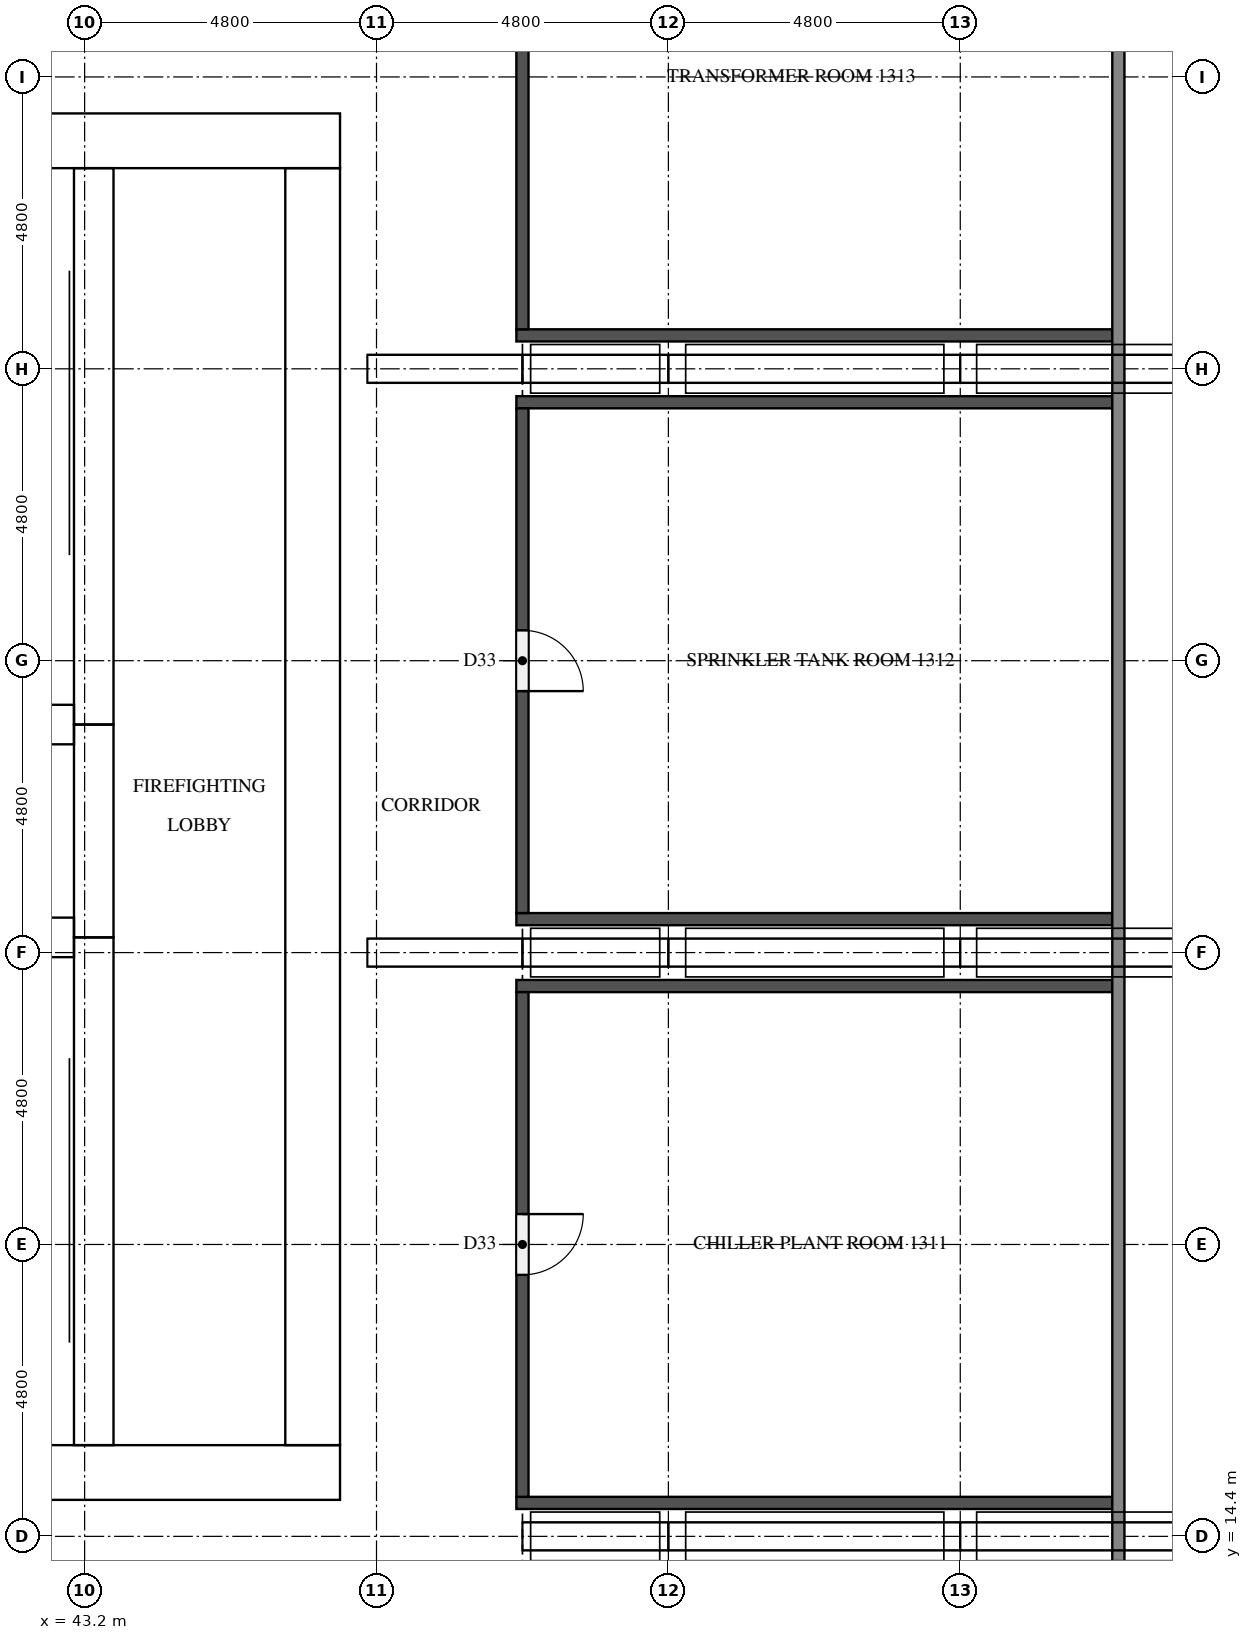
"""IFC4 building model, lengths in metres.
Left out: names, types, materials, properties, quantities, classifications, styles, units other than length and angle.
Written with IfcOpenShell. Run it as: python <this file> out.ifc"""

import sys

from ifc_helpers import new_model, si_unit, direction, frame, frame_2d, origin, place, context, subcontext, project, spatial, rectangle, extrude, element, fill, save


model = new_model("IFC4")
c1 = context("Model", 3, precision=1e-05, world=origin(), true_north=direction((0.0, 1.0)))
c2 = subcontext(c1, "Body", "Model", "MODEL_VIEW")
j1 = project(units=[si_unit("LENGTHUNIT", "METRE"), si_unit("PLANEANGLEUNIT", "RADIAN")], contexts=[c1])
p1 = place(None, origin())
s1 = spatial("IfcSite", under=j1, at=p1, CompositionType="ELEMENT")
p2 = place(p1, origin())
s2 = spatial("IfcBuilding", under=s1, at=p2, CompositionType="ELEMENT")
p3 = place(p2, frame((0.0, 0.0, 53.9)))
s3 = spatial("IfcBuildingStorey", under=s2, at=p3, CompositionType="ELEMENT", Elevation=53.9)
p4 = place(p3, frame((15.0, 15.45, 0.0), z_axis=(0.0, 0.0, 1.0), x_axis=(1.0, 0.0, 0.0)))
e1 = element("IfcWall", 1, at=p4, inside=s3, PredefinedType="SHEAR", context=c2, shape_type="SweptSolid", body=[
    extrude(rectangle(XDim=32.4, YDim=0.9, at=frame_2d((16.2, 0.0))), origin(), (0.0, 0.0, 1.0), 5.1),
])
p5 = place(p4, frame((15.3, 0.0, 0.0)))
e2 = element("IfcOpeningElement", 2, at=p5, cuts=e1, PredefinedType="OPENING", context=c2, shape_type="SweptSolid", body=[
    extrude(rectangle(XDim=1.8, YDim=2.1, at=frame_2d((0.9, 1.05))), frame((0.0, 0.46, 0.0), z_axis=(0.0, -1.0, 0.0), x_axis=(1.0, 0.0, 0.0)), (0.0, 0.0, 1.0), 0.92),
])
p6 = place(p3, frame((15.0, 37.35, 0.0), z_axis=(0.0, 0.0, 1.0), x_axis=(1.0, 0.0, 0.0)))
e3 = element("IfcWall", 3, at=p6, inside=s3, PredefinedType="SHEAR", context=c2, shape_type="SweptSolid", body=[
    extrude(rectangle(XDim=32.4, YDim=0.9, at=frame_2d((16.2, 0.0))), origin(), (0.0, 0.0, 1.0), 5.1),
])
p7 = place(p6, frame((15.3, 0.0, 0.0)))
e4 = element("IfcOpeningElement", 4, at=p7, cuts=e3, PredefinedType="OPENING", context=c2, shape_type="SweptSolid", body=[
    extrude(rectangle(XDim=1.8, YDim=2.1, at=frame_2d((0.9, 1.05))), frame((0.0, 0.46, 0.0), z_axis=(0.0, -1.0, 0.0), x_axis=(1.0, 0.0, 0.0)), (0.0, 0.0, 1.0), 0.92),
])
p8 = place(p6, frame((1.794, 0.0, 0.0)))
e5 = element("IfcOpeningElement", 5, at=p8, cuts=e3, PredefinedType="OPENING", context=c2, shape_type="SweptSolid", body=[
    extrude(rectangle(XDim=1.0, YDim=2.1, at=frame_2d((0.5, 1.05))), frame((0.0, 0.46, 0.0), z_axis=(0.0, -1.0, 0.0), x_axis=(1.0, 0.0, 0.0)), (0.0, 0.0, 1.0), 0.92),
])
p9 = place(p6, frame((5.331, 0.0, 0.0)))
e6 = element("IfcOpeningElement", 6, at=p9, cuts=e3, PredefinedType="OPENING", context=c2, shape_type="SweptSolid", body=[
    extrude(rectangle(XDim=1.0, YDim=2.1, at=frame_2d((0.5, 1.05))), frame((0.0, 0.46, 0.0), z_axis=(0.0, -1.0, 0.0), x_axis=(1.0, 0.0, 0.0)), (0.0, 0.0, 1.0), 0.92),
])
p10 = place(p3, frame((46.95, 15.9, 0.0), z_axis=(0.0, 0.0, 1.0), x_axis=(0.0, 1.0, 0.0)))
e7 = element("IfcWall", 7, at=p10, inside=s3, PredefinedType="SHEAR", context=c2, shape_type="SweptSolid", body=[
    extrude(rectangle(XDim=21.0, YDim=0.9, at=frame_2d((10.5, 0.0))), origin(), (0.0, 0.0, 1.0), 5.1),
])
p11 = place(p10, frame((10.2, 0.0, 0.0)))
e8 = element("IfcOpeningElement", 8, at=p11, cuts=e7, PredefinedType="OPENING", context=c2, shape_type="SweptSolid", body=[
    extrude(rectangle(XDim=1.2, YDim=2.1, at=frame_2d((0.6, 1.05))), frame((0.0, 0.46, 0.0), z_axis=(0.0, -1.0, 0.0), x_axis=(1.0, 0.0, 0.0)), (0.0, 0.0, 1.0), 0.92),
])
p12 = place(p3, frame((43.35, 15.9, 0.0), z_axis=(0.0, 0.0, 1.0), x_axis=(0.0, 1.0, 0.0)))
e9 = element("IfcWall", 9, at=p12, inside=s3, PredefinedType="SHEAR", context=c2, shape_type="SweptSolid", body=[
    extrude(rectangle(XDim=8.35, YDim=0.65, at=frame_2d((4.175, 0.0))), origin(), (0.0, 0.0, 1.0), 5.1),
])
p13 = place(p12, frame((0.3, 0.0, 0.0)))
e10 = element("IfcOpeningElement", 10, at=p13, cuts=e9, PredefinedType="OPENING", context=c2, shape_type="SweptSolid", body=[
    extrude(rectangle(XDim=1.2, YDim=2.1, at=frame_2d((0.6, 1.05))), frame((0.0, 0.335, 0.0), z_axis=(0.0, -1.0, 0.0), x_axis=(1.0, 0.0, 0.0)), (0.0, 0.0, 1.0), 0.67),
])
p14 = place(p3, frame((43.35, 24.25, 0.0), z_axis=(0.0, 0.0, 1.0), x_axis=(0.0, 1.0, 0.0)))
e11 = element("IfcWall", 11, at=p14, inside=s3, PredefinedType="SHEAR", context=c2, shape_type="SweptSolid", body=[
    extrude(rectangle(XDim=3.5, YDim=0.65, at=frame_2d((1.75, 0.0))), origin(), (0.0, 0.0, 1.0), 5.1),
])
p15 = place(p14, frame((1.2, 0.0, 0.0)))
e12 = element("IfcOpeningElement", 12, at=p15, cuts=e11, PredefinedType="OPENING", context=c2, shape_type="SweptSolid", body=[
    extrude(rectangle(XDim=1.1, YDim=2.1, at=frame_2d((0.55, 1.05))), frame((0.0, 0.335, 0.0), z_axis=(0.0, -1.0, 0.0), x_axis=(1.0, 0.0, 0.0)), (0.0, 0.0, 1.0), 0.67),
])
p16 = place(p3, frame((43.35, 27.75, 0.0), z_axis=(0.0, 0.0, 1.0), x_axis=(0.0, 1.0, 0.0)))
e13 = element("IfcWall", 13, at=p16, inside=s3, PredefinedType="SHEAR", context=c2, shape_type="SweptSolid", body=[
    extrude(rectangle(XDim=9.15, YDim=0.65, at=frame_2d((4.575, 0.0))), origin(), (0.0, 0.0, 1.0), 5.1),
])
p17 = place(p16, frame((7.65, 0.0, 0.0)))
e14 = element("IfcOpeningElement", 14, at=p17, cuts=e13, PredefinedType="OPENING", context=c2, shape_type="SweptSolid", body=[
    extrude(rectangle(XDim=1.2, YDim=2.1, at=frame_2d((0.6, 1.05))), frame((0.0, 0.335, 0.0), z_axis=(0.0, -1.0, 0.0), x_axis=(1.0, 0.0, 0.0)), (0.0, 0.0, 1.0), 0.67),
])
for number, where, z_axis, x_axis in (
    (15, (39.625, 24.25, 0.0), (0.0, 0.0, 1.0), (1.0, 0.0, 0.0)),
    (16, (39.625, 27.75, 0.0), (0.0, 0.0, 1.0), (1.0, 0.0, 0.0)),
):
    element("IfcWall", number, at=place(p3, frame(where, z_axis=z_axis, x_axis=x_axis)), inside=s3, PredefinedType="SHEAR", context=c2, shape_type="SweptSolid", body=[
        extrude(rectangle(XDim=3.4, YDim=0.65, at=frame_2d((1.7, 0.0))), origin(), (0.0, 0.0, 1.0), 5.1),
    ])
for number, where, z_axis, x_axis in (
    (17, (50.3, 14.95, 0.0), (0.0, 0.0, 1.0), (1.0, 0.0, 0.0)),
    (18, (50.3, 23.45, 0.0), (0.0, 0.0, 1.0), (1.0, 0.0, 0.0)),
    (19, (50.3, 24.55, 0.0), (0.0, 0.0, 1.0), (1.0, 0.0, 0.0)),
    (20, (50.3, 33.05, 0.0), (0.0, 0.0, 1.0), (1.0, 0.0, 0.0)),
    (21, (50.3, 34.15, 0.0), (0.0, 0.0, 1.0), (1.0, 0.0, 0.0)),
):
    element("IfcWall", number, at=place(p3, frame(where, z_axis=z_axis, x_axis=x_axis)), inside=s3, PredefinedType="PARTITIONING", context=c2, shape_type="SweptSolid", body=[
        extrude(rectangle(XDim=9.8, YDim=0.2, at=frame_2d((4.9, 0.0))), origin(), (0.0, 0.0, 1.0), 5.1),
    ])
p18 = place(p3, frame((50.4, 23.35, 0.0), z_axis=(0.0, 0.0, 1.0), x_axis=(0.0, -1.0, 0.0)))
e22 = element("IfcWall", 22, at=p18, inside=s3, PredefinedType="PARTITIONING", context=c2, shape_type="SweptSolid", body=[
    extrude(rectangle(XDim=8.3, YDim=0.2, at=frame_2d((4.15, 0.0))), origin(), (0.0, 0.0, 1.0), 5.1),
])
p19 = place(p18, frame((3.65, 0.0, 0.0)))
e23 = element("IfcOpeningElement", 23, at=p19, cuts=e22, PredefinedType="OPENING", context=c2, shape_type="SweptSolid", body=[
    extrude(rectangle(XDim=1.0, YDim=2.1, at=frame_2d((0.5, 1.05))), frame((0.0, 0.11, 0.0), z_axis=(0.0, -1.0, 0.0), x_axis=(1.0, 0.0, 0.0)), (0.0, 0.0, 1.0), 0.22),
])
p20 = place(p3, frame((50.4, 32.95, 0.0), z_axis=(0.0, 0.0, 1.0), x_axis=(0.0, -1.0, 0.0)))
e24 = element("IfcWall", 24, at=p20, inside=s3, PredefinedType="PARTITIONING", context=c2, shape_type="SweptSolid", body=[
    extrude(rectangle(XDim=8.3, YDim=0.2, at=frame_2d((4.15, 0.0))), origin(), (0.0, 0.0, 1.0), 5.1),
])
p21 = place(p20, frame((3.65, 0.0, 0.0)))
e25 = element("IfcOpeningElement", 25, at=p21, cuts=e24, PredefinedType="OPENING", context=c2, shape_type="SweptSolid", body=[
    extrude(rectangle(XDim=1.0, YDim=2.1, at=frame_2d((0.5, 1.05))), frame((0.0, 0.11, 0.0), z_axis=(0.0, -1.0, 0.0), x_axis=(1.0, 0.0, 0.0)), (0.0, 0.0, 1.0), 0.22),
])
p22 = place(p3, frame((50.4, 34.25, 0.0), z_axis=(0.0, 0.0, 1.0), x_axis=(0.0, 1.0, 0.0)))
e26 = element("IfcWall", 26, at=p22, inside=s3, PredefinedType="PARTITIONING", context=c2, shape_type="SweptSolid", body=[
    extrude(rectangle(XDim=6.45, YDim=0.2, at=frame_2d((3.225, 0.0))), origin(), (0.0, 0.0, 1.0), 5.1),
])
p23 = place(p15, origin())
e27 = element("IfcDoor", 27, at=p23, inside=s3, OperationType="DOUBLE_DOOR_SLIDING", PredefinedType="DOOR", context=c2, shape_type="SweptSolid", body=[
    extrude(rectangle(XDim=1.1, YDim=2.1, at=frame_2d((0.55, 1.05))), frame((0.0, 0.025, 0.0), z_axis=(0.0, -1.0, 0.0), x_axis=(1.0, 0.0, 0.0)), (0.0, 0.0, 1.0), 0.05),
])
fill(e12, e27)
p24 = place(p13, origin())
e28 = element("IfcDoor", 28, at=p24, inside=s3, OperationType="SINGLE_SWING_RIGHT", PredefinedType="DOOR", context=c2, shape_type="SweptSolid", body=[
    extrude(rectangle(XDim=1.2, YDim=2.1, at=frame_2d((0.6, 1.05))), frame((0.0, 0.025, 0.0), z_axis=(0.0, -1.0, 0.0), x_axis=(1.0, 0.0, 0.0)), (0.0, 0.0, 1.0), 0.05),
])
fill(e10, e28)
p25 = place(p17, origin())
e29 = element("IfcDoor", 29, at=p25, inside=s3, OperationType="SINGLE_SWING_LEFT", PredefinedType="DOOR", context=c2, shape_type="SweptSolid", body=[
    extrude(rectangle(XDim=1.2, YDim=2.1, at=frame_2d((0.6, 1.05))), frame((0.0, 0.025, 0.0), z_axis=(0.0, -1.0, 0.0), x_axis=(1.0, 0.0, 0.0)), (0.0, 0.0, 1.0), 0.05),
])
fill(e14, e29)
p26 = place(p11, origin())
e30 = element("IfcDoor", 30, at=p26, inside=s3, OperationType="SINGLE_SWING_LEFT", PredefinedType="DOOR", context=c2, shape_type="SweptSolid", body=[
    extrude(rectangle(XDim=1.2, YDim=2.1, at=frame_2d((0.6, 1.05))), frame((0.0, 0.025, 0.0), z_axis=(0.0, -1.0, 0.0), x_axis=(1.0, 0.0, 0.0)), (0.0, 0.0, 1.0), 0.05),
])
fill(e8, e30)
p27 = place(p19, origin())
e31 = element("IfcDoor", 31, at=p27, inside=s3, OperationType="SINGLE_SWING_LEFT", PredefinedType="DOOR", context=c2, shape_type="SweptSolid", body=[
    extrude(rectangle(XDim=1.0, YDim=2.1, at=frame_2d((0.5, 1.05))), frame((0.0, 0.025, 0.0), z_axis=(0.0, -1.0, 0.0), x_axis=(1.0, 0.0, 0.0)), (0.0, 0.0, 1.0), 0.05),
])
fill(e23, e31)
p28 = place(p21, origin())
e32 = element("IfcDoor", 32, at=p28, inside=s3, OperationType="SINGLE_SWING_RIGHT", PredefinedType="DOOR", context=c2, shape_type="SweptSolid", body=[
    extrude(rectangle(XDim=1.0, YDim=2.1, at=frame_2d((0.5, 1.05))), frame((0.0, 0.025, 0.0), z_axis=(0.0, -1.0, 0.0), x_axis=(1.0, 0.0, 0.0)), (0.0, 0.0, 1.0), 0.05),
])
fill(e25, e32)
save(model, sys.argv[1])
